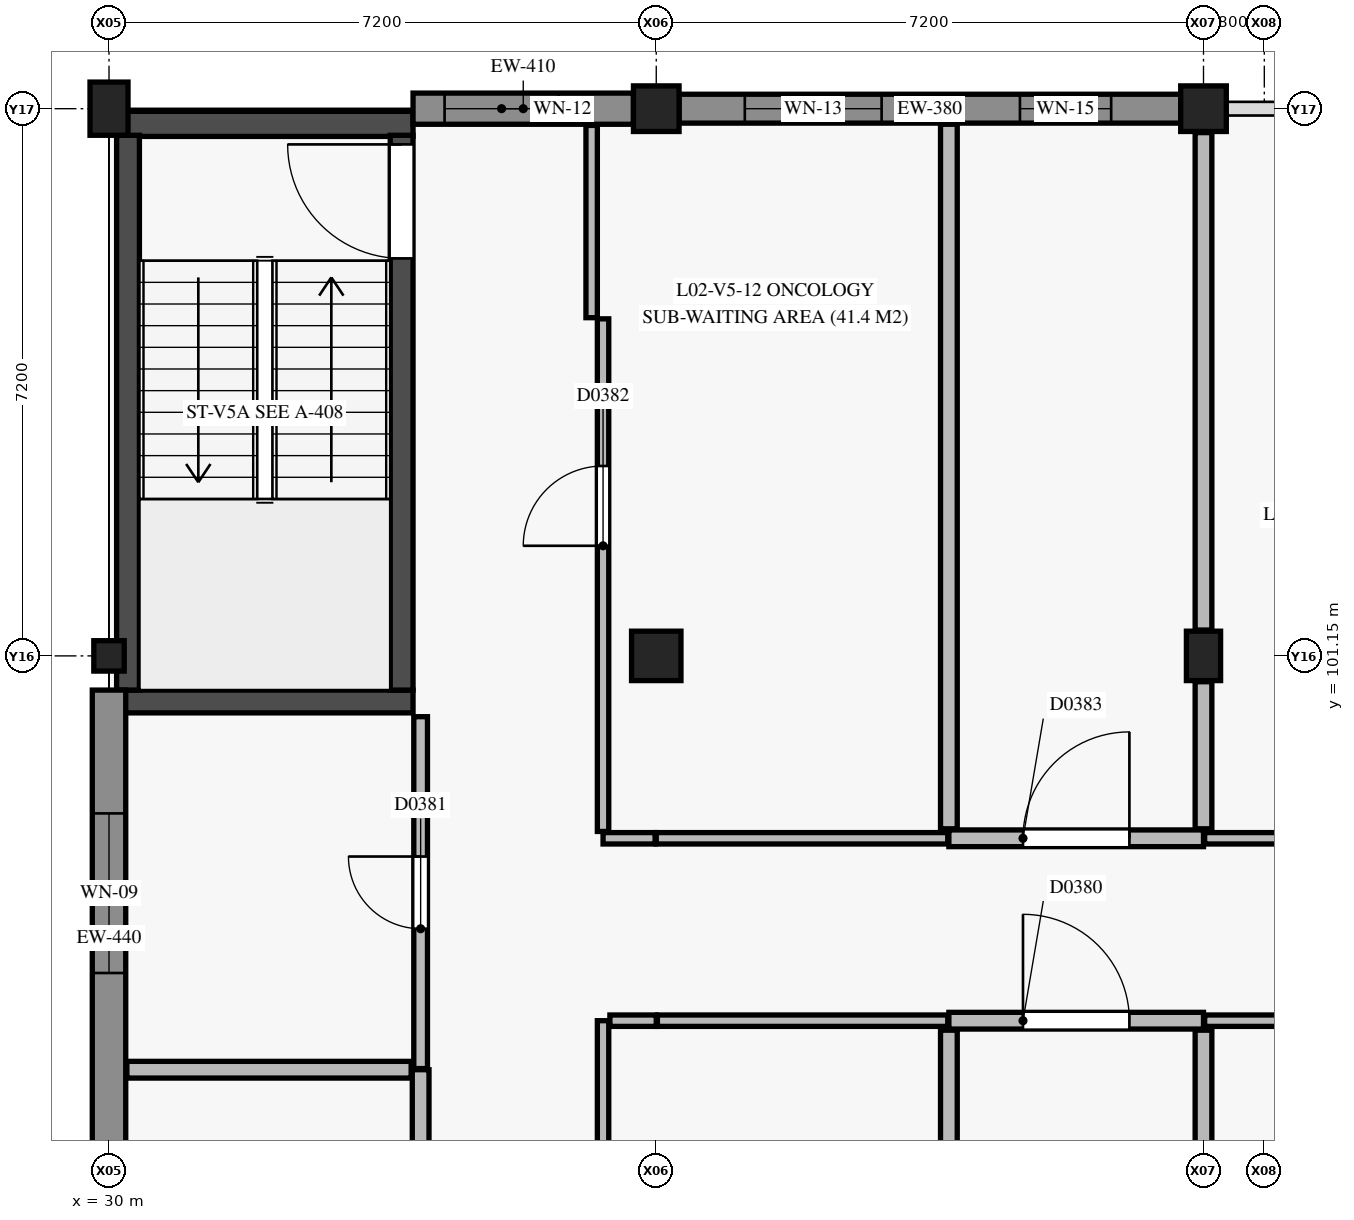
"""IFC4 building model, lengths in metres.
Left out: names, types, materials, properties, quantities, classifications, styles, units other than length and angle.
Written with IfcOpenShell. Run it as: python <this file> out.ifc"""

import sys

from ifc_helpers import new_model, si_unit, direction, frame, frame_2d, origin, origin_2d, place, context, subcontext, project, spatial, rectangle, circle, extrude, element, fill, save


model = new_model("IFC4")
c1 = context("Model", 3, precision=1e-05, world=origin(), true_north=direction((0.0, 1.0)))
c2 = subcontext(c1, "Body", "Model", "MODEL_VIEW")
j1 = project(units=[si_unit("LENGTHUNIT", "METRE"), si_unit("PLANEANGLEUNIT", "RADIAN")], contexts=[c1])
p1 = place(None, origin())
s1 = spatial("IfcSite", under=j1, at=p1, CompositionType="ELEMENT")
p2 = place(p1, origin())
s2 = spatial("IfcBuilding", under=s1, at=p2, CompositionType="ELEMENT")
p3 = place(p2, frame((0.0, 0.0, 9.0)))
s3 = spatial("IfcBuildingStorey", under=s2, at=p3, CompositionType="ELEMENT", Elevation=9.0)
p4 = place(p3, frame((30.0, 101.15, 0.0), z_axis=(0.0, 0.0, 1.0), x_axis=(1.0, 0.0, 0.0)))
e1 = element("IfcColumn", 1, at=p4, inside=s3, PredefinedType="COLUMN", context=c2, shape_type="SweptSolid", body=[
    extrude(rectangle(XDim=0.4, YDim=0.4, at=origin_2d()), origin(), (0.0, 0.0, 1.0), 4.2),
])
p5 = place(p3, frame((30.0, 108.35, 0.0), z_axis=(0.0, 0.0, 1.0), x_axis=(1.0, 0.0, 0.0)))
e2 = element("IfcColumn", 2, at=p5, inside=s3, PredefinedType="COLUMN", context=c2, shape_type="SweptSolid", body=[
    extrude(rectangle(XDim=0.5, YDim=0.7, at=origin_2d()), origin(), (0.0, 0.0, 1.0), 4.2),
])
p6 = place(p3, frame((37.2, 101.15, 0.0), z_axis=(0.0, 0.0, 1.0), x_axis=(1.0, 0.0, 0.0)))
e3 = element("IfcColumn", 3, at=p6, inside=s3, PredefinedType="COLUMN", context=c2, shape_type="SweptSolid", body=[
    extrude(rectangle(XDim=0.65, YDim=0.65, at=origin_2d()), origin(), (0.0, 0.0, 1.0), 4.2),
])
p7 = place(p3, frame((37.2, 108.35, 0.0), z_axis=(0.0, 0.0, 1.0), x_axis=(1.0, 0.0, 0.0)))
e4 = element("IfcColumn", 4, at=p7, inside=s3, PredefinedType="COLUMN", context=c2, shape_type="SweptSolid", body=[
    extrude(rectangle(XDim=0.6, YDim=0.6, at=origin_2d()), origin(), (0.0, 0.0, 1.0), 4.2),
])
p8 = place(p3, frame((44.4, 101.15, 0.0), z_axis=(0.0, 0.0, 1.0), x_axis=(1.0, 0.0, 0.0)))
e5 = element("IfcColumn", 5, at=p8, inside=s3, PredefinedType="COLUMN", context=c2, shape_type="SweptSolid", body=[
    extrude(rectangle(XDim=0.45, YDim=0.65, at=origin_2d()), origin(), (0.0, 0.0, 1.0), 4.2),
])
p9 = place(p3, frame((44.4, 108.35, 0.0), z_axis=(0.0, 0.0, 1.0), x_axis=(1.0, 0.0, 0.0)))
e6 = element("IfcColumn", 6, at=p9, inside=s3, PredefinedType="COLUMN", context=c2, shape_type="SweptSolid", body=[
    extrude(circle(Radius=0.3, at=origin_2d()), origin(), (0.0, 0.0, 1.0), 4.2),
])
p10 = place(p3, frame((30.1, 100.55, 0.0), z_axis=(0.0, 0.0, 1.0), x_axis=(1.0, 0.0, 0.0)))
e7 = element("IfcWall", 7, at=p10, inside=s3, PredefinedType="SHEAR", context=c2, shape_type="SweptSolid", body=[
    extrude(rectangle(XDim=3.9, YDim=0.3, at=frame_2d((1.95, 0.0))), origin(), (0.0, 0.0, 1.0), 3.95),
])
p11 = place(p3, frame((30.1, 108.15, 0.0), z_axis=(0.0, 0.0, 1.0), x_axis=(1.0, 0.0, 0.0)))
e8 = element("IfcWall", 8, at=p11, inside=s3, PredefinedType="SHEAR", context=c2, shape_type="SweptSolid", body=[
    extrude(rectangle(XDim=3.9, YDim=0.33, at=frame_2d((1.95, 0.0))), origin(), (0.0, 0.0, 1.0), 3.95),
])
p12 = place(p3, frame((30.25, 100.7, 0.0), z_axis=(0.0, 0.0, 1.0), x_axis=(0.0, 1.0, 0.0)))
e9 = element("IfcWall", 9, at=p12, inside=s3, PredefinedType="SHEAR", context=c2, shape_type="SweptSolid", body=[
    extrude(rectangle(XDim=7.3, YDim=0.3, at=frame_2d((3.65, 0.0))), origin(), (0.0, 0.0, 1.0), 3.95),
])
p13 = place(p3, frame((33.85, 100.7, 0.0), z_axis=(0.0, 0.0, 1.0), x_axis=(0.0, 1.0, 0.0)))
e10 = element("IfcWall", 10, at=p13, inside=s3, PredefinedType="SHEAR", context=c2, shape_type="SweptSolid", body=[
    extrude(rectangle(XDim=7.3, YDim=0.3, at=frame_2d((3.65, 0.0))), origin(), (0.0, 0.0, 1.0), 3.95),
])
p14 = place(p13, frame((5.68, 0.0, 0.0)))
e11 = element("IfcOpeningElement", 11, at=p14, cuts=e10, PredefinedType="OPENING", context=c2, shape_type="SweptSolid", body=[
    extrude(rectangle(XDim=1.5, YDim=2.15, at=frame_2d((0.75, 1.075))), frame((0.0, 0.16, 0.0), z_axis=(0.0, -1.0, 0.0), x_axis=(1.0, 0.0, 0.0)), (0.0, 0.0, 1.0), 0.32),
])
p15 = place(p3, frame((30.0, 94.175, 0.0), z_axis=(0.0, 0.0, 1.0), x_axis=(0.0, 1.0, 0.0)))
e12 = element("IfcWall", 12, at=p15, inside=s3, PredefinedType="USERDEFINED", context=c2, shape_type="SweptSolid", body=[
    extrude(rectangle(XDim=6.525, YDim=0.44, at=frame_2d((3.262, 0.0))), origin(), (0.0, 0.0, 1.0), 3.13),
])
p16 = place(p15, frame((2.802, 0.0, 0.9)))
e13 = element("IfcOpeningElement", 13, at=p16, cuts=e12, PredefinedType="OPENING", context=c2, shape_type="SweptSolid", body=[
    extrude(rectangle(XDim=2.1, YDim=1.8, at=frame_2d((1.05, 0.9))), frame((0.0, 0.23, 0.0), z_axis=(0.0, -1.0, 0.0), x_axis=(1.0, 0.0, 0.0)), (0.0, 0.0, 1.0), 0.46),
])
p17 = place(p3, frame((34.0, 108.35, 0.0), z_axis=(0.0, 0.0, 1.0), x_axis=(1.0, 0.0, 0.0)))
e14 = element("IfcWall", 14, at=p17, inside=s3, PredefinedType="USERDEFINED", context=c2, shape_type="SweptSolid", body=[
    extrude(rectangle(XDim=2.9, YDim=0.41, at=frame_2d((1.45, 0.0))), origin(), (0.0, 0.0, 1.0), 3.13),
])
p18 = place(p17, frame((0.415, 0.0, 0.9)))
e15 = element("IfcOpeningElement", 15, at=p18, cuts=e14, PredefinedType="OPENING", context=c2, shape_type="SweptSolid", body=[
    extrude(rectangle(XDim=1.5, YDim=1.5, at=frame_2d((0.75, 0.75))), frame((0.0, 0.215, 0.0), z_axis=(0.0, -1.0, 0.0), x_axis=(1.0, 0.0, 0.0)), (0.0, 0.0, 1.0), 0.43),
])
p19 = place(p3, frame((37.5, 108.35, 0.0), z_axis=(0.0, 0.0, 1.0), x_axis=(1.0, 0.0, 0.0)))
e16 = element("IfcWall", 16, at=p19, inside=s3, PredefinedType="USERDEFINED", context=c2, shape_type="SweptSolid", body=[
    extrude(rectangle(XDim=6.6, YDim=0.38, at=frame_2d((3.3, 0.0))), origin(), (0.0, 0.0, 1.0), 3.13),
])
p20 = place(p19, frame((0.865, 0.0, 0.9)))
e17 = element("IfcOpeningElement", 17, at=p20, cuts=e16, PredefinedType="OPENING", context=c2, shape_type="SweptSolid", body=[
    extrude(rectangle(XDim=1.8, YDim=1.5, at=frame_2d((0.9, 0.75))), frame((0.0, 0.2, 0.0), z_axis=(0.0, -1.0, 0.0), x_axis=(1.0, 0.0, 0.0)), (0.0, 0.0, 1.0), 0.4),
])
p21 = place(p19, frame((4.485, 0.0, 0.6)))
e18 = element("IfcOpeningElement", 18, at=p21, cuts=e16, PredefinedType="OPENING", context=c2, shape_type="SweptSolid", body=[
    extrude(rectangle(XDim=1.2, YDim=2.2, at=frame_2d((0.6, 1.1))), frame((0.0, 0.2, 0.0), z_axis=(0.0, -1.0, 0.0), x_axis=(1.0, 0.0, 0.0)), (0.0, 0.0, 1.0), 0.4),
])
p22 = place(p3, frame((34.1, 83.8, 0.0), z_axis=(0.0, 0.0, 1.0), x_axis=(0.0, 1.0, 0.0)))
e19 = element("IfcWall", 19, at=p22, inside=s3, PredefinedType="PARTITIONING", context=c2, shape_type="SweptSolid", body=[
    extrude(rectangle(XDim=11.905, YDim=0.22, at=frame_2d((5.953, 0.0))), origin(), (0.0, 0.0, 1.0), 3.135),
])
p23 = place(p22, frame((5.252, 0.0, 0.0)))
e20 = element("IfcOpeningElement", 20, at=p23, cuts=e19, PredefinedType="OPENING", context=c2, shape_type="SweptSolid", body=[
    extrude(rectangle(XDim=1.4, YDim=2.2, at=frame_2d((0.7, 1.1))), frame((0.0, 0.12, 0.0), z_axis=(0.0, -1.0, 0.0), x_axis=(1.0, 0.0, 0.0)), (0.0, 0.0, 1.0), 0.24),
])
p24 = place(p3, frame((41.05, 96.35, 0.0), z_axis=(0.0, 0.0, 1.0), x_axis=(1.0, 0.0, 0.0)))
e21 = element("IfcWall", 21, at=p24, inside=s3, PredefinedType="PARTITIONING", context=c2, shape_type="SweptSolid", body=[
    extrude(rectangle(XDim=3.35, YDim=0.22, at=frame_2d((1.675, 0.0))), origin(), (0.0, 0.0, 1.0), 3.355),
])
p25 = place(p24, frame((0.975, 0.0, 0.0)))
e22 = element("IfcOpeningElement", 22, at=p25, cuts=e21, PredefinedType="OPENING", context=c2, shape_type="SweptSolid", body=[
    extrude(rectangle(XDim=1.4, YDim=2.2, at=frame_2d((0.7, 1.1))), frame((0.0, 0.12, 0.0), z_axis=(0.0, -1.0, 0.0), x_axis=(1.0, 0.0, 0.0)), (0.0, 0.0, 1.0), 0.24),
])
p26 = place(p3, frame((41.05, 98.75, 0.0), z_axis=(0.0, 0.0, 1.0), x_axis=(1.0, 0.0, 0.0)))
e23 = element("IfcWall", 23, at=p26, inside=s3, PredefinedType="PARTITIONING", context=c2, shape_type="SweptSolid", body=[
    extrude(rectangle(XDim=3.35, YDim=0.22, at=frame_2d((1.675, 0.0))), origin(), (0.0, 0.0, 1.0), 3.355),
])
p27 = place(p26, frame((0.975, 0.0, 0.0)))
e24 = element("IfcOpeningElement", 24, at=p27, cuts=e23, PredefinedType="OPENING", context=c2, shape_type="SweptSolid", body=[
    extrude(rectangle(XDim=1.4, YDim=2.2, at=frame_2d((0.7, 1.1))), frame((0.0, 0.12, 0.0), z_axis=(0.0, -1.0, 0.0), x_axis=(1.0, 0.0, 0.0)), (0.0, 0.0, 1.0), 0.24),
])
p28 = place(p3, frame((34.1, 95.72, 0.0), z_axis=(0.0, 0.0, 1.0), x_axis=(0.0, 1.0, 0.0)))
e25 = element("IfcWall", 25, at=p28, inside=s3, PredefinedType="PLUMBINGWALL", context=c2, shape_type="SweptSolid", body=[
    extrude(rectangle(XDim=4.63, YDim=0.18, at=frame_2d((2.315, 0.0))), origin(), (0.0, 0.0, 1.0), 3.475),
])
p29 = place(p28, frame((1.84, 0.0, 0.0)))
e26 = element("IfcOpeningElement", 26, at=p29, cuts=e25, PredefinedType="OPENING", context=c2, shape_type="SweptSolid", body=[
    extrude(rectangle(XDim=0.95, YDim=2.1, at=frame_2d((0.475, 1.05))), frame((0.0, 0.1, 0.0), z_axis=(0.0, -1.0, 0.0), x_axis=(1.0, 0.0, 0.0)), (0.0, 0.0, 1.0), 0.2),
])
p30 = place(p3, frame((44.415, 96.35, 0.0), z_axis=(0.0, 0.0, 1.0), x_axis=(1.0, 0.0, 0.0)))
e27 = element("IfcWall", 27, at=p30, inside=s3, PredefinedType="PARTITIONING", context=c2, shape_type="SweptSolid", body=[
    extrude(rectangle(XDim=5.035, YDim=0.15, at=frame_2d((2.518, 0.0))), origin(), (0.0, 0.0, 1.0), 3.355),
])
p31 = place(p3, frame((44.415, 98.75, 0.0), z_axis=(0.0, 0.0, 1.0), x_axis=(1.0, 0.0, 0.0)))
e28 = element("IfcWall", 28, at=p31, inside=s3, PredefinedType="PARTITIONING", context=c2, shape_type="SweptSolid", body=[
    extrude(rectangle(XDim=4.945, YDim=0.15, at=frame_2d((2.473, 0.0))), origin(), (0.0, 0.0, 1.0), 3.355),
])
p32 = place(p3, frame((36.5, 83.89, 0.0), z_axis=(0.0, 0.0, 1.0), x_axis=(0.0, 1.0, 0.0)))
e29 = element("IfcWall", 29, at=p32, inside=s3, PredefinedType="PARTITIONING", context=c2, shape_type="SweptSolid", body=[
    extrude(rectangle(XDim=12.46, YDim=0.15, at=frame_2d((6.23, 0.0))), origin(), (0.0, 0.0, 1.0), 3.135),
])
p33 = place(p32, frame((5.43, 0.0, 0.0)))
e30 = element("IfcOpeningElement", 30, at=p33, cuts=e29, PredefinedType="OPENING", context=c2, shape_type="SweptSolid", body=[
    extrude(rectangle(XDim=1.6, YDim=2.25, at=frame_2d((0.8, 1.125))), frame((0.0, 0.085, 0.0), z_axis=(0.0, -1.0, 0.0), x_axis=(1.0, 0.0, 0.0)), (0.0, 0.0, 1.0), 0.17),
])
p34 = place(p3, frame((36.59, 96.35, 0.0), z_axis=(0.0, 0.0, 1.0), x_axis=(1.0, 0.0, 0.0)))
e31 = element("IfcWall", 31, at=p34, inside=s3, PredefinedType="PARTITIONING", context=c2, shape_type="SweptSolid", body=[
    extrude(rectangle(XDim=0.61, YDim=0.15, at=frame_2d((0.305, 0.0))), origin(), (0.0, 0.0, 1.0), 3.385),
])
p35 = place(p3, frame((37.215, 96.35, 0.0), z_axis=(0.0, 0.0, 1.0), x_axis=(1.0, 0.0, 0.0)))
e32 = element("IfcWall", 32, at=p35, inside=s3, PredefinedType="PARTITIONING", context=c2, shape_type="SweptSolid", body=[
    extrude(rectangle(XDim=3.82, YDim=0.15, at=frame_2d((1.91, 0.0))), origin(), (0.0, 0.0, 1.0), 3.385),
])
p36 = place(p3, frame((36.35, 105.6, 0.0), z_axis=(0.0, 0.0, 1.0), x_axis=(0.0, 1.0, 0.0)))
e33 = element("IfcWall", 33, at=p36, inside=s3, PredefinedType="PARTITIONING", context=c2, shape_type="SweptSolid", body=[
    extrude(rectangle(XDim=2.53, YDim=0.15, at=frame_2d((1.265, 0.0))), origin(), (0.0, 0.0, 1.0), 3.95),
])
p37 = place(p3, frame((37.2, 98.75, 0.0), z_axis=(0.0, 0.0, 1.0), x_axis=(1.0, 0.0, 0.0)))
e34 = element("IfcWall", 34, at=p37, inside=s3, PredefinedType="PARTITIONING", context=c2, shape_type="SweptSolid", body=[
    extrude(rectangle(XDim=3.835, YDim=0.15, at=frame_2d((1.917, 0.0))), origin(), (0.0, 0.0, 1.0), 3.385),
])
p38 = place(p3, frame((36.5, 98.75, 0.0), z_axis=(0.0, 0.0, 1.0), x_axis=(1.0, 0.0, 0.0)))
e35 = element("IfcWall", 35, at=p38, inside=s3, PredefinedType="PARTITIONING", context=c2, shape_type="SweptSolid", body=[
    extrude(rectangle(XDim=0.685, YDim=0.15, at=frame_2d((0.343, 0.0))), origin(), (0.0, 0.0, 1.0), 3.385),
])
p39 = place(p3, frame((36.5, 98.84, 0.0), z_axis=(0.0, 0.0, 1.0), x_axis=(0.0, 1.0, 0.0)))
e36 = element("IfcWall", 36, at=p39, inside=s3, PredefinedType="PARTITIONING", context=c2, shape_type="SweptSolid", body=[
    extrude(rectangle(XDim=6.745, YDim=0.15, at=frame_2d((3.373, 0.0))), origin(), (0.0, 0.0, 1.0), 3.95),
])
p40 = place(p39, frame((3.759, 0.0, 0.0)))
e37 = element("IfcOpeningElement", 37, at=p40, cuts=e36, PredefinedType="OPENING", context=c2, shape_type="SweptSolid", body=[
    extrude(rectangle(XDim=1.05, YDim=2.15, at=frame_2d((0.525, 1.075))), frame((0.0, 0.085, 0.0), z_axis=(0.0, -1.0, 0.0), x_axis=(1.0, 0.0, 0.0)), (0.0, 0.0, 1.0), 0.17),
])
p41 = place(p3, frame((44.4, 98.875, 0.0), z_axis=(0.0, 0.0, 1.0), x_axis=(0.0, 1.0, 0.0)))
e38 = element("IfcWall", 38, at=p41, inside=s3, PredefinedType="PARTITIONING", context=c2, shape_type="SweptSolid", body=[
    extrude(rectangle(XDim=1.935, YDim=0.22, at=frame_2d((0.968, 0.0))), origin(), (0.0, 0.0, 1.0), 3.355),
])
p42 = place(p3, frame((44.4, 101.49, 0.0), z_axis=(0.0, 0.0, 1.0), x_axis=(0.0, 1.0, 0.0)))
e39 = element("IfcWall", 39, at=p42, inside=s3, PredefinedType="PARTITIONING", context=c2, shape_type="SweptSolid", body=[
    extrude(rectangle(XDim=6.545, YDim=0.22, at=frame_2d((3.272, 0.0))), origin(), (0.0, 0.0, 1.0), 3.355),
])
p43 = place(p3, frame((44.4, 94.315, 0.0), z_axis=(0.0, 0.0, 1.0), x_axis=(0.0, 1.0, 0.0)))
e40 = element("IfcWall", 40, at=p43, inside=s3, PredefinedType="PARTITIONING", context=c2, shape_type="SweptSolid", body=[
    extrude(rectangle(XDim=1.91, YDim=0.22, at=frame_2d((0.955, 0.0))), origin(), (0.0, 0.0, 1.0), 3.355),
])
p44 = place(p3, frame((30.235, 95.705, 0.0), z_axis=(0.0, 0.0, 1.0), x_axis=(1.0, 0.0, 0.0)))
e41 = element("IfcWall", 41, at=p44, inside=s3, PredefinedType="PARTITIONING", context=c2, shape_type="SweptSolid", body=[
    extrude(rectangle(XDim=3.74, YDim=0.22, at=frame_2d((1.87, 0.0))), origin(), (0.0, 0.0, 1.0), 3.95),
])
p45 = place(p3, frame((41.05, 90.425, 0.0), z_axis=(0.0, 0.0, 1.0), x_axis=(0.0, 1.0, 0.0)))
e42 = element("IfcWall", 42, at=p45, inside=s3, PredefinedType="PARTITIONING", context=c2, shape_type="SweptSolid", body=[
    extrude(rectangle(XDim=5.8, YDim=0.22, at=frame_2d((2.9, 0.0))), origin(), (0.0, 0.0, 1.0), 3.355),
])
p46 = place(p3, frame((41.05, 98.875, 0.0), z_axis=(0.0, 0.0, 1.0), x_axis=(0.0, 1.0, 0.0)))
e43 = element("IfcWall", 43, at=p46, inside=s3, PredefinedType="PARTITIONING", context=c2, shape_type="SweptSolid", body=[
    extrude(rectangle(XDim=9.27, YDim=0.22, at=frame_2d((4.635, 0.0))), origin(), (0.0, 0.0, 1.0), 3.385),
])
p47 = place(p16, origin())
e44 = element("IfcWindow", 44, at=p47, inside=s3, PartitioningType="SINGLE_PANEL", PredefinedType="WINDOW", context=c2, shape_type="SweptSolid", body=[
    extrude(rectangle(XDim=2.1, YDim=1.8, at=frame_2d((1.05, 0.9))), frame((0.0, 0.03, 0.0), z_axis=(0.0, -1.0, 0.0), x_axis=(1.0, 0.0, 0.0)), (0.0, 0.0, 1.0), 0.06),
])
fill(e13, e44)
p48 = place(p18, origin())
e45 = element("IfcWindow", 45, at=p48, inside=s3, PartitioningType="SINGLE_PANEL", PredefinedType="WINDOW", context=c2, shape_type="SweptSolid", body=[
    extrude(rectangle(XDim=1.5, YDim=1.5, at=frame_2d((0.75, 0.75))), frame((0.0, 0.03, 0.0), z_axis=(0.0, -1.0, 0.0), x_axis=(1.0, 0.0, 0.0)), (0.0, 0.0, 1.0), 0.06),
])
fill(e15, e45)
p49 = place(p20, origin())
e46 = element("IfcWindow", 46, at=p49, inside=s3, PartitioningType="SINGLE_PANEL", PredefinedType="WINDOW", context=c2, shape_type="SweptSolid", body=[
    extrude(rectangle(XDim=1.8, YDim=1.5, at=frame_2d((0.9, 0.75))), frame((0.0, 0.03, 0.0), z_axis=(0.0, -1.0, 0.0), x_axis=(1.0, 0.0, 0.0)), (0.0, 0.0, 1.0), 0.06),
])
fill(e17, e46)
p50 = place(p21, origin())
e47 = element("IfcWindow", 47, at=p50, inside=s3, PartitioningType="SINGLE_PANEL", PredefinedType="WINDOW", context=c2, shape_type="SweptSolid", body=[
    extrude(rectangle(XDim=1.2, YDim=2.2, at=frame_2d((0.6, 1.1))), frame((0.0, 0.03, 0.0), z_axis=(0.0, -1.0, 0.0), x_axis=(1.0, 0.0, 0.0)), (0.0, 0.0, 1.0), 0.06),
])
fill(e18, e47)
p51 = place(p14, origin())
e48 = element("IfcDoor", 48, at=p51, inside=s3, OperationType="SINGLE_SWING_RIGHT", PredefinedType="DOOR", context=c2, shape_type="SweptSolid", body=[
    extrude(rectangle(XDim=1.5, YDim=2.15, at=frame_2d((0.75, 1.075))), frame((0.0, 0.025, 0.0), z_axis=(0.0, -1.0, 0.0), x_axis=(1.0, 0.0, 0.0)), (0.0, 0.0, 1.0), 0.05),
])
fill(e11, e48)
p52 = place(p25, origin())
e49 = element("IfcDoor", 49, at=p52, inside=s3, OperationType="SINGLE_SWING_LEFT", PredefinedType="DOOR", context=c2, shape_type="SweptSolid", body=[
    extrude(rectangle(XDim=1.4, YDim=2.2, at=frame_2d((0.7, 1.1))), frame((0.0, 0.025, 0.0), z_axis=(0.0, -1.0, 0.0), x_axis=(1.0, 0.0, 0.0)), (0.0, 0.0, 1.0), 0.05),
])
fill(e22, e49)
p53 = place(p29, origin())
e50 = element("IfcDoor", 50, at=p53, inside=s3, OperationType="SINGLE_SWING_RIGHT", PredefinedType="DOOR", context=c2, shape_type="SweptSolid", body=[
    extrude(rectangle(XDim=0.95, YDim=2.1, at=frame_2d((0.475, 1.05))), frame((0.0, 0.025, 0.0), z_axis=(0.0, -1.0, 0.0), x_axis=(1.0, 0.0, 0.0)), (0.0, 0.0, 1.0), 0.05),
])
fill(e26, e50)
p54 = place(p40, origin())
e51 = element("IfcDoor", 51, at=p54, inside=s3, OperationType="SINGLE_SWING_LEFT", PredefinedType="DOOR", context=c2, shape_type="SweptSolid", body=[
    extrude(rectangle(XDim=1.05, YDim=2.15, at=frame_2d((0.525, 1.075))), frame((0.0, 0.025, 0.0), z_axis=(0.0, -1.0, 0.0), x_axis=(1.0, 0.0, 0.0)), (0.0, 0.0, 1.0), 0.05),
])
fill(e37, e51)
p55 = place(p27, origin())
e52 = element("IfcDoor", 52, at=p55, inside=s3, OperationType="SINGLE_SWING_RIGHT", PredefinedType="DOOR", context=c2, shape_type="SweptSolid", body=[
    extrude(rectangle(XDim=1.4, YDim=2.2, at=frame_2d((0.7, 1.1))), frame((0.0, 0.025, 0.0), z_axis=(0.0, -1.0, 0.0), x_axis=(1.0, 0.0, 0.0)), (0.0, 0.0, 1.0), 0.05),
])
fill(e24, e52)
save(model, sys.argv[1])
